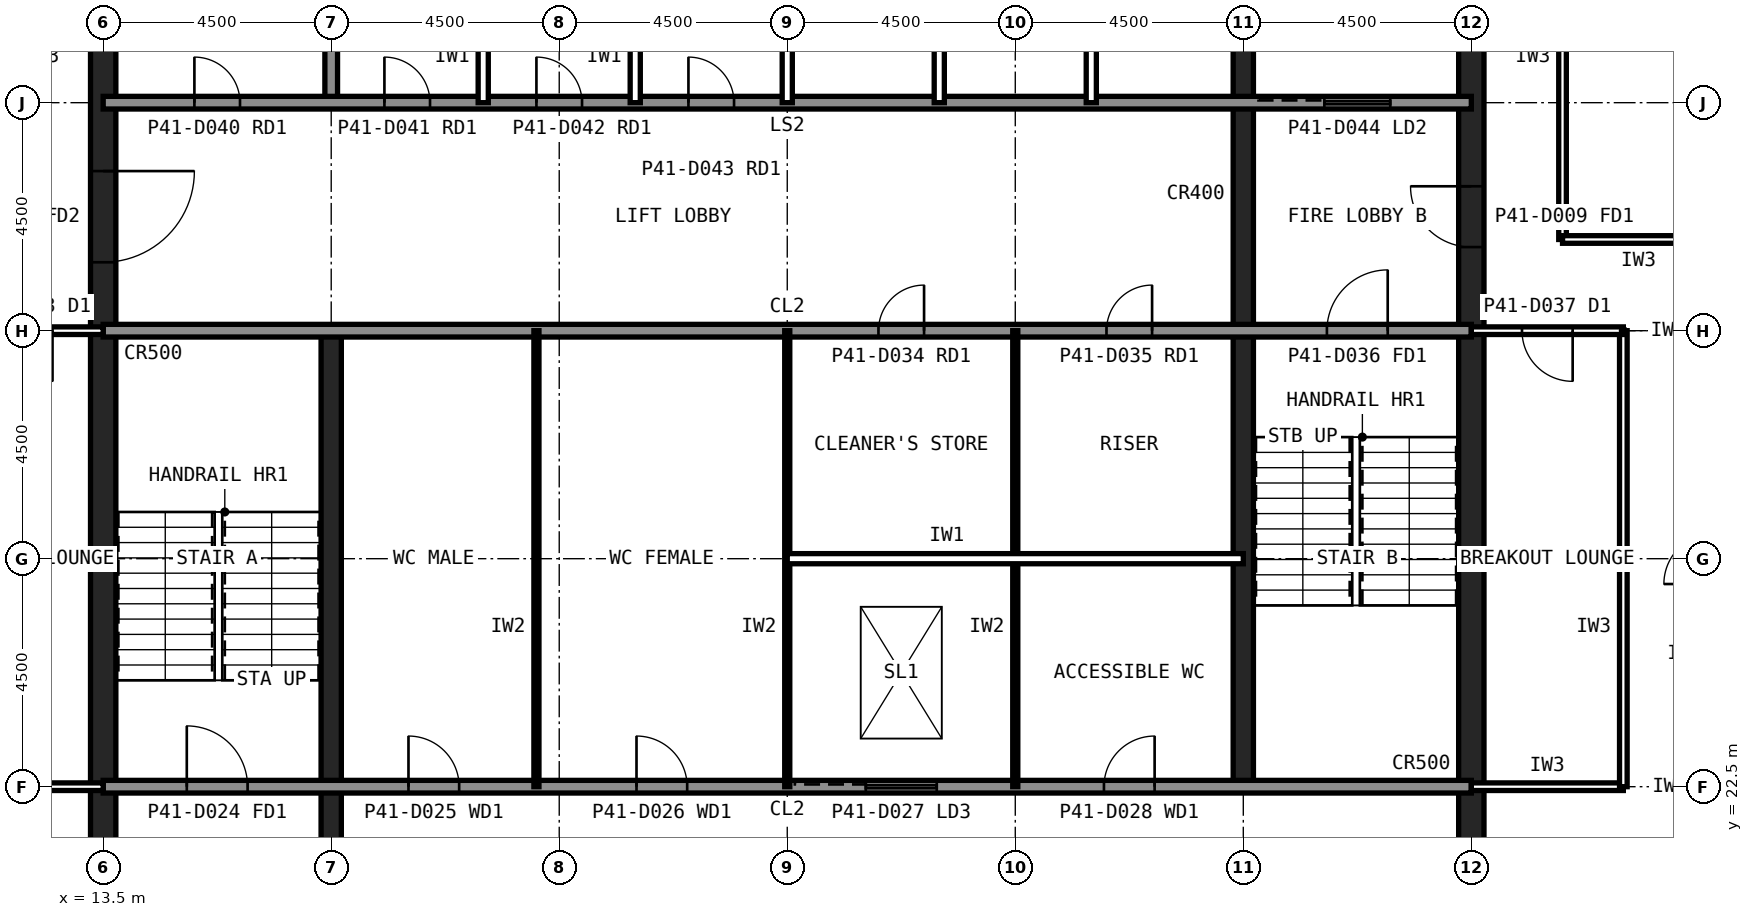
"""IFC4 building model, lengths in metres.
Left out: names, types, materials, properties, quantities, classifications, styles, units other than length and angle.
Written with IfcOpenShell. Run it as: python <this file> out.ifc"""

import sys

from ifc_helpers import new_model, si_unit, direction, frame, frame_2d, origin, place, context, subcontext, project, spatial, rectangle, extrude, element, fill, save


model = new_model("IFC4")
c1 = context("Model", 3, precision=1e-05, world=origin(), true_north=direction((0.0, 1.0)))
c2 = subcontext(c1, "Body", "Model", "MODEL_VIEW")
j1 = project(units=[si_unit("LENGTHUNIT", "METRE"), si_unit("PLANEANGLEUNIT", "RADIAN")], contexts=[c1])
p1 = place(None, origin())
s1 = spatial("IfcSite", under=j1, at=p1, CompositionType="ELEMENT")
p2 = place(p1, origin())
s2 = spatial("IfcBuilding", under=s1, at=p2, CompositionType="ELEMENT")
p3 = place(p2, frame((0.0, 0.0, 175.6)))
s3 = spatial("IfcBuildingStorey", under=s2, at=p3, CompositionType="ELEMENT", Elevation=175.6)
p4 = place(p3, frame((40.5, 13.5, 0.0), z_axis=(0.0, 0.0, 1.0), x_axis=(0.0, 1.0, 0.0)))
e1 = element("IfcWall", 1, at=p4, inside=s3, PredefinedType="SHEAR", context=c2, shape_type="SweptSolid", body=[
    extrude(rectangle(XDim=27.0, YDim=0.5, at=frame_2d((13.5, 0.0))), origin(), (0.0, 0.0, 1.0), 4.0),
])
p5 = place(p4, frame((5.85, 0.0, 0.0)))
e2 = element("IfcOpeningElement", 2, at=p5, cuts=e1, PredefinedType="OPENING", context=c2, shape_type="SweptSolid", body=[
    extrude(rectangle(XDim=1.8, YDim=2.1, at=frame_2d((0.9, 1.05))), frame((0.0, 0.26, 0.0), z_axis=(0.0, -1.0, 0.0), x_axis=(1.0, 0.0, 0.0)), (0.0, 0.0, 1.0), 0.52),
])
p6 = place(p4, frame((19.65, 0.0, 0.0)))
e3 = element("IfcOpeningElement", 3, at=p6, cuts=e1, PredefinedType="OPENING", context=c2, shape_type="SweptSolid", body=[
    extrude(rectangle(XDim=1.2, YDim=2.1, at=frame_2d((0.6, 1.05))), frame((0.0, 0.26, 0.0), z_axis=(0.0, -1.0, 0.0), x_axis=(1.0, 0.0, 0.0)), (0.0, 0.0, 1.0), 0.52),
])
p7 = place(p3, frame((13.5, 40.5, 0.0), z_axis=(0.0, 0.0, 1.0), x_axis=(0.0, -1.0, 0.0)))
e4 = element("IfcWall", 4, at=p7, inside=s3, PredefinedType="SHEAR", context=c2, shape_type="SweptSolid", body=[
    extrude(rectangle(XDim=27.0, YDim=0.5, at=frame_2d((13.5, 0.0))), origin(), (0.0, 0.0, 1.0), 4.0),
])
p8 = place(p7, frame((19.65, 0.0, 0.0)))
e5 = element("IfcOpeningElement", 5, at=p8, cuts=e4, PredefinedType="OPENING", context=c2, shape_type="SweptSolid", body=[
    extrude(rectangle(XDim=1.2, YDim=2.1, at=frame_2d((0.6, 1.05))), frame((0.0, 0.26, 0.0), z_axis=(0.0, -1.0, 0.0), x_axis=(1.0, 0.0, 0.0)), (0.0, 0.0, 1.0), 0.52),
])
p9 = place(p7, frame((5.85, 0.0, 0.0)))
e6 = element("IfcOpeningElement", 6, at=p9, cuts=e4, PredefinedType="OPENING", context=c2, shape_type="SweptSolid", body=[
    extrude(rectangle(XDim=1.8, YDim=2.1, at=frame_2d((0.9, 1.05))), frame((0.0, 0.26, 0.0), z_axis=(0.0, -1.0, 0.0), x_axis=(1.0, 0.0, 0.0)), (0.0, 0.0, 1.0), 0.52),
])
p10 = place(p3, frame((18.0, 13.5, 0.0), z_axis=(0.0, 0.0, 1.0), x_axis=(0.0, 1.0, 0.0)))
e7 = element("IfcWall", 7, at=p10, inside=s3, PredefinedType="SHEAR", context=c2, shape_type="SweptSolid", body=[
    extrude(rectangle(XDim=18.0, YDim=0.4, at=frame_2d((9.0, 0.0))), origin(), (0.0, 0.0, 1.0), 4.0),
])
p11 = place(p3, frame((18.0, 36.0, 0.0), z_axis=(0.0, 0.0, 1.0), x_axis=(0.0, 1.0, 0.0)))
e8 = element("IfcWall", 8, at=p11, inside=s3, PredefinedType="SOLIDWALL", context=c2, shape_type="SweptSolid", body=[
    extrude(rectangle(XDim=4.5, YDim=0.25, at=frame_2d((2.25, 0.0))), origin(), (0.0, 0.0, 1.0), 3.84),
])
p12 = place(p3, frame((36.0, 22.5, 0.0), z_axis=(0.0, 0.0, 1.0), x_axis=(0.0, 1.0, 0.0)))
e9 = element("IfcWall", 9, at=p12, inside=s3, PredefinedType="SHEAR", context=c2, shape_type="SweptSolid", body=[
    extrude(rectangle(XDim=18.0, YDim=0.4, at=frame_2d((9.0, 0.0))), origin(), (0.0, 0.0, 1.0), 4.0),
])
p13 = place(p3, frame((13.5, 36.0, 0.0), z_axis=(0.0, 0.0, 1.0), x_axis=(1.0, 0.0, 0.0)))
e10 = element("IfcWall", 10, at=p13, inside=s3, PredefinedType="SOLIDWALL", context=c2, shape_type="SweptSolid", body=[
    extrude(rectangle(XDim=27.0, YDim=0.25, at=frame_2d((13.5, 0.0))), origin(), (0.0, 0.0, 1.0), 3.84),
])
p14 = place(p13, frame((1.8, 0.0, 0.0)))
e11 = element("IfcOpeningElement", 11, at=p14, cuts=e10, PredefinedType="OPENING", context=c2, shape_type="SweptSolid", body=[
    extrude(rectangle(XDim=0.9, YDim=2.1, at=frame_2d((0.45, 1.05))), frame((0.0, 0.135, 0.0), z_axis=(0.0, -1.0, 0.0), x_axis=(1.0, 0.0, 0.0)), (0.0, 0.0, 1.0), 0.27),
])
p15 = place(p13, frame((5.55, 0.0, 0.0)))
e12 = element("IfcOpeningElement", 12, at=p15, cuts=e10, PredefinedType="OPENING", context=c2, shape_type="SweptSolid", body=[
    extrude(rectangle(XDim=0.9, YDim=2.1, at=frame_2d((0.45, 1.05))), frame((0.0, 0.135, 0.0), z_axis=(0.0, -1.0, 0.0), x_axis=(1.0, 0.0, 0.0)), (0.0, 0.0, 1.0), 0.27),
])
p16 = place(p13, frame((8.55, 0.0, 0.0)))
e13 = element("IfcOpeningElement", 13, at=p16, cuts=e10, PredefinedType="OPENING", context=c2, shape_type="SweptSolid", body=[
    extrude(rectangle(XDim=0.9, YDim=2.1, at=frame_2d((0.45, 1.05))), frame((0.0, 0.135, 0.0), z_axis=(0.0, -1.0, 0.0), x_axis=(1.0, 0.0, 0.0)), (0.0, 0.0, 1.0), 0.27),
])
p17 = place(p13, frame((11.55, 0.0, 0.0)))
e14 = element("IfcOpeningElement", 14, at=p17, cuts=e10, PredefinedType="OPENING", context=c2, shape_type="SweptSolid", body=[
    extrude(rectangle(XDim=0.9, YDim=2.1, at=frame_2d((0.45, 1.05))), frame((0.0, 0.135, 0.0), z_axis=(0.0, -1.0, 0.0), x_axis=(1.0, 0.0, 0.0)), (0.0, 0.0, 1.0), 0.27),
])
p18 = place(p13, frame((24.1, 0.0, 0.0)))
e15 = element("IfcOpeningElement", 15, at=p18, cuts=e10, PredefinedType="OPENING", context=c2, shape_type="SweptSolid", body=[
    extrude(rectangle(XDim=1.3, YDim=2.2, at=frame_2d((0.65, 1.1))), frame((0.0, 0.135, 0.0), z_axis=(0.0, -1.0, 0.0), x_axis=(1.0, 0.0, 0.0)), (0.0, 0.0, 1.0), 0.27),
])
p19 = place(p3, frame((13.5, 22.5, 0.0), z_axis=(0.0, 0.0, 1.0), x_axis=(1.0, 0.0, 0.0)))
e16 = element("IfcWall", 16, at=p19, inside=s3, PredefinedType="SOLIDWALL", context=c2, shape_type="SweptSolid", body=[
    extrude(rectangle(XDim=27.0, YDim=0.25, at=frame_2d((13.5, 0.0))), origin(), (0.0, 0.0, 1.0), 3.84),
])
p20 = place(p19, frame((1.65, 0.0, 0.0)))
e17 = element("IfcOpeningElement", 17, at=p20, cuts=e16, PredefinedType="OPENING", context=c2, shape_type="SweptSolid", body=[
    extrude(rectangle(XDim=1.2, YDim=2.1, at=frame_2d((0.6, 1.05))), frame((0.0, 0.135, 0.0), z_axis=(0.0, -1.0, 0.0), x_axis=(1.0, 0.0, 0.0)), (0.0, 0.0, 1.0), 0.27),
])
p21 = place(p19, frame((6.025, 0.0, 0.0)))
e18 = element("IfcOpeningElement", 18, at=p21, cuts=e16, PredefinedType="OPENING", context=c2, shape_type="SweptSolid", body=[
    extrude(rectangle(XDim=1.0, YDim=2.1, at=frame_2d((0.5, 1.05))), frame((0.0, 0.135, 0.0), z_axis=(0.0, -1.0, 0.0), x_axis=(1.0, 0.0, 0.0)), (0.0, 0.0, 1.0), 0.27),
])
p22 = place(p19, frame((10.525, 0.0, 0.0)))
e19 = element("IfcOpeningElement", 19, at=p22, cuts=e16, PredefinedType="OPENING", context=c2, shape_type="SweptSolid", body=[
    extrude(rectangle(XDim=1.0, YDim=2.1, at=frame_2d((0.5, 1.05))), frame((0.0, 0.135, 0.0), z_axis=(0.0, -1.0, 0.0), x_axis=(1.0, 0.0, 0.0)), (0.0, 0.0, 1.0), 0.27),
])
p23 = place(p19, frame((19.75, 0.0, 0.0)))
e20 = element("IfcOpeningElement", 20, at=p23, cuts=e16, PredefinedType="OPENING", context=c2, shape_type="SweptSolid", body=[
    extrude(rectangle(XDim=1.0, YDim=2.1, at=frame_2d((0.5, 1.05))), frame((0.0, 0.135, 0.0), z_axis=(0.0, -1.0, 0.0), x_axis=(1.0, 0.0, 0.0)), (0.0, 0.0, 1.0), 0.27),
])
p24 = place(p19, frame((15.05, 0.0, 0.0)))
e21 = element("IfcOpeningElement", 21, at=p24, cuts=e16, PredefinedType="OPENING", context=c2, shape_type="SweptSolid", body=[
    extrude(rectangle(XDim=1.4, YDim=2.4, at=frame_2d((0.7, 1.2))), frame((0.0, 0.135, 0.0), z_axis=(0.0, -1.0, 0.0), x_axis=(1.0, 0.0, 0.0)), (0.0, 0.0, 1.0), 0.27),
])
p25 = place(p3, frame((13.5, 31.5, 0.0), z_axis=(0.0, 0.0, 1.0), x_axis=(1.0, 0.0, 0.0)))
e22 = element("IfcWall", 22, at=p25, inside=s3, PredefinedType="SOLIDWALL", context=c2, shape_type="SweptSolid", body=[
    extrude(rectangle(XDim=27.0, YDim=0.25, at=frame_2d((13.5, 0.0))), origin(), (0.0, 0.0, 1.0), 3.84),
])
p26 = place(p25, frame((24.15, 0.0, 0.0)))
e23 = element("IfcOpeningElement", 23, at=p26, cuts=e22, PredefinedType="OPENING", context=c2, shape_type="SweptSolid", body=[
    extrude(rectangle(XDim=1.2, YDim=2.1, at=frame_2d((0.6, 1.05))), frame((0.0, 0.135, 0.0), z_axis=(0.0, -1.0, 0.0), x_axis=(1.0, 0.0, 0.0)), (0.0, 0.0, 1.0), 0.27),
])
p27 = place(p25, frame((15.3, 0.0, 0.0)))
e24 = element("IfcOpeningElement", 24, at=p27, cuts=e22, PredefinedType="OPENING", context=c2, shape_type="SweptSolid", body=[
    extrude(rectangle(XDim=0.9, YDim=2.1, at=frame_2d((0.45, 1.05))), frame((0.0, 0.135, 0.0), z_axis=(0.0, -1.0, 0.0), x_axis=(1.0, 0.0, 0.0)), (0.0, 0.0, 1.0), 0.27),
])
p28 = place(p25, frame((19.8, 0.0, 0.0)))
e25 = element("IfcOpeningElement", 25, at=p28, cuts=e22, PredefinedType="OPENING", context=c2, shape_type="SweptSolid", body=[
    extrude(rectangle(XDim=0.9, YDim=2.1, at=frame_2d((0.45, 1.05))), frame((0.0, 0.135, 0.0), z_axis=(0.0, -1.0, 0.0), x_axis=(1.0, 0.0, 0.0)), (0.0, 0.0, 1.0), 0.27),
])
for number, where, z_axis, x_axis in (
    (26, (21.0, 36.0, 0.0), (0.0, 0.0, 1.0), (0.0, 1.0, 0.0)),
    (27, (24.0, 36.0, 0.0), (0.0, 0.0, 1.0), (0.0, 1.0, 0.0)),
    (28, (27.0, 36.0, 0.0), (0.0, 0.0, 1.0), (0.0, 1.0, 0.0)),
    (29, (30.0, 36.0, 0.0), (0.0, 0.0, 1.0), (0.0, 1.0, 0.0)),
    (30, (33.0, 36.0, 0.0), (0.0, 0.0, 1.0), (0.0, 1.0, 0.0)),
):
    element("IfcWall", number, at=place(p3, frame(where, z_axis=z_axis, x_axis=x_axis)), inside=s3, PredefinedType="PARTITIONING", context=c2, shape_type="SweptSolid", body=[
        extrude(rectangle(XDim=4.5, YDim=0.2, at=frame_2d((2.25, 0.0))), origin(), (0.0, 0.0, 1.0), 3.84),
    ])
for number, where, z_axis, x_axis in (
    (31, (22.05, 22.5, 0.0), (0.0, 0.0, 1.0), (0.0, 1.0, 0.0)),
    (32, (27.0, 22.5, 0.0), (0.0, 0.0, 1.0), (0.0, 1.0, 0.0)),
    (33, (31.5, 22.5, 0.0), (0.0, 0.0, 1.0), (0.0, 1.0, 0.0)),
):
    element("IfcWall", number, at=place(p3, frame(where, z_axis=z_axis, x_axis=x_axis)), inside=s3, PredefinedType="PLUMBINGWALL", context=c2, shape_type="SweptSolid", body=[
        extrude(rectangle(XDim=9.0, YDim=0.1, at=frame_2d((4.5, 0.0))), origin(), (0.0, 0.0, 1.0), 3.84),
    ])
p29 = place(p3, frame((27.0, 27.0, 0.0), z_axis=(0.0, 0.0, 1.0), x_axis=(1.0, 0.0, 0.0)))
e34 = element("IfcWall", 34, at=p29, inside=s3, PredefinedType="PARTITIONING", context=c2, shape_type="SweptSolid", body=[
    extrude(rectangle(XDim=9.0, YDim=0.2, at=frame_2d((4.5, 0.0))), origin(), (0.0, 0.0, 1.0), 3.84),
])
p30 = place(p3, frame((42.3, 33.3, 0.0), z_axis=(0.0, 0.0, 1.0), x_axis=(0.0, 1.0, 0.0)))
e35 = element("IfcWall", 35, at=p30, inside=s3, PredefinedType="PARTITIONING", context=c2, shape_type="SweptSolid", body=[
    extrude(rectangle(XDim=7.2, YDim=0.15, at=frame_2d((3.6, 0.0))), origin(), (0.0, 0.0, 1.0), 3.84),
])
p31 = place(p3, frame((45.3, 33.3, 0.0), z_axis=(0.0, 0.0, 1.0), x_axis=(-1.0, 0.0, 0.0)))
e36 = element("IfcWall", 36, at=p31, inside=s3, PredefinedType="PARTITIONING", context=c2, shape_type="SweptSolid", body=[
    extrude(rectangle(XDim=3.0, YDim=0.15, at=frame_2d((1.5, 0.0))), origin(), (0.0, 0.0, 1.0), 3.84),
])
p32 = place(p3, frame((40.5, 22.5, 0.0), z_axis=(0.0, 0.0, 1.0), x_axis=(1.0, 0.0, 0.0)))
e37 = element("IfcWall", 37, at=p32, inside=s3, PredefinedType="PARTITIONING", context=c2, shape_type="SweptSolid", body=[
    extrude(rectangle(XDim=3.0, YDim=0.15, at=frame_2d((1.5, 0.0))), origin(), (0.0, 0.0, 1.0), 2.989),
])
p33 = place(p3, frame((43.5, 22.5, 0.0), z_axis=(0.0, 0.0, 1.0), x_axis=(0.0, 1.0, 0.0)))
e38 = element("IfcWall", 38, at=p33, inside=s3, PredefinedType="PARTITIONING", context=c2, shape_type="SweptSolid", body=[
    extrude(rectangle(XDim=9.0, YDim=0.15, at=frame_2d((4.5, 0.0))), origin(), (0.0, 0.0, 1.0), 3.84),
])
p34 = place(p3, frame((43.5, 31.5, 0.0), z_axis=(0.0, 0.0, 1.0), x_axis=(-1.0, 0.0, 0.0)))
e39 = element("IfcWall", 39, at=p34, inside=s3, PredefinedType="PARTITIONING", context=c2, shape_type="SweptSolid", body=[
    extrude(rectangle(XDim=3.0, YDim=0.15, at=frame_2d((1.5, 0.0))), origin(), (0.0, 0.0, 1.0), 2.989),
])
p35 = place(p34, frame((1.0, 0.0, 0.0)))
e40 = element("IfcOpeningElement", 40, at=p35, cuts=e39, PredefinedType="OPENING", context=c2, shape_type="SweptSolid", body=[
    extrude(rectangle(XDim=1.0, YDim=2.1, at=frame_2d((0.5, 1.05))), frame((0.0, 0.085, 0.0), z_axis=(0.0, -1.0, 0.0), x_axis=(1.0, 0.0, 0.0)), (0.0, 0.0, 1.0), 0.17),
])
p36 = place(p3, frame((10.5, 22.5, 0.0), z_axis=(0.0, 0.0, 1.0), x_axis=(1.0, 0.0, 0.0)))
e41 = element("IfcWall", 41, at=p36, inside=s3, PredefinedType="PARTITIONING", context=c2, shape_type="SweptSolid", body=[
    extrude(rectangle(XDim=3.0, YDim=0.15, at=frame_2d((1.5, 0.0))), origin(), (0.0, 0.0, 1.0), 2.989),
])
p37 = place(p3, frame((13.5, 31.5, 0.0), z_axis=(0.0, 0.0, 1.0), x_axis=(-1.0, 0.0, 0.0)))
e42 = element("IfcWall", 42, at=p37, inside=s3, PredefinedType="PARTITIONING", context=c2, shape_type="SweptSolid", body=[
    extrude(rectangle(XDim=3.0, YDim=0.15, at=frame_2d((1.5, 0.0))), origin(), (0.0, 0.0, 1.0), 2.989),
])
p38 = place(p37, frame((1.0, 0.0, 0.0)))
e43 = element("IfcOpeningElement", 43, at=p38, cuts=e42, PredefinedType="OPENING", context=c2, shape_type="SweptSolid", body=[
    extrude(rectangle(XDim=1.0, YDim=2.1, at=frame_2d((0.5, 1.05))), frame((0.0, 0.085, 0.0), z_axis=(0.0, -1.0, 0.0), x_axis=(1.0, 0.0, 0.0)), (0.0, 0.0, 1.0), 0.17),
])
p39 = place(p9, origin())
e44 = element("IfcDoor", 44, at=p39, inside=s3, OperationType="SINGLE_SWING_LEFT", PredefinedType="DOOR", context=c2, shape_type="SweptSolid", body=[
    extrude(rectangle(XDim=1.8, YDim=2.1, at=frame_2d((0.9, 1.05))), frame((0.0, 0.025, 0.0), z_axis=(0.0, -1.0, 0.0), x_axis=(1.0, 0.0, 0.0)), (0.0, 0.0, 1.0), 0.05),
])
fill(e6, e44)
p40 = place(p6, origin())
e45 = element("IfcDoor", 45, at=p40, inside=s3, OperationType="SINGLE_SWING_RIGHT", PredefinedType="DOOR", context=c2, shape_type="SweptSolid", body=[
    extrude(rectangle(XDim=1.2, YDim=2.1, at=frame_2d((0.6, 1.05))), frame((0.0, 0.025, 0.0), z_axis=(0.0, -1.0, 0.0), x_axis=(1.0, 0.0, 0.0)), (0.0, 0.0, 1.0), 0.05),
])
fill(e3, e45)
p41 = place(p20, origin())
e46 = element("IfcDoor", 46, at=p41, inside=s3, OperationType="SINGLE_SWING_LEFT", PredefinedType="DOOR", context=c2, shape_type="SweptSolid", body=[
    extrude(rectangle(XDim=1.2, YDim=2.1, at=frame_2d((0.6, 1.05))), frame((0.0, 0.025, 0.0), z_axis=(0.0, -1.0, 0.0), x_axis=(1.0, 0.0, 0.0)), (0.0, 0.0, 1.0), 0.05),
])
fill(e17, e46)
p42 = place(p26, origin())
e47 = element("IfcDoor", 47, at=p42, inside=s3, OperationType="SINGLE_SWING_RIGHT", PredefinedType="DOOR", context=c2, shape_type="SweptSolid", body=[
    extrude(rectangle(XDim=1.2, YDim=2.1, at=frame_2d((0.6, 1.05))), frame((0.0, 0.025, 0.0), z_axis=(0.0, -1.0, 0.0), x_axis=(1.0, 0.0, 0.0)), (0.0, 0.0, 1.0), 0.05),
])
fill(e23, e47)
p43 = place(p21, origin())
e48 = element("IfcDoor", 48, at=p43, inside=s3, OperationType="SINGLE_SWING_LEFT", PredefinedType="DOOR", context=c2, shape_type="SweptSolid", body=[
    extrude(rectangle(XDim=1.0, YDim=2.1, at=frame_2d((0.5, 1.05))), frame((0.0, 0.025, 0.0), z_axis=(0.0, -1.0, 0.0), x_axis=(1.0, 0.0, 0.0)), (0.0, 0.0, 1.0), 0.05),
])
fill(e18, e48)
p44 = place(p22, origin())
e49 = element("IfcDoor", 49, at=p44, inside=s3, OperationType="SINGLE_SWING_LEFT", PredefinedType="DOOR", context=c2, shape_type="SweptSolid", body=[
    extrude(rectangle(XDim=1.0, YDim=2.1, at=frame_2d((0.5, 1.05))), frame((0.0, 0.025, 0.0), z_axis=(0.0, -1.0, 0.0), x_axis=(1.0, 0.0, 0.0)), (0.0, 0.0, 1.0), 0.05),
])
fill(e19, e49)
p45 = place(p23, origin())
e50 = element("IfcDoor", 50, at=p45, inside=s3, OperationType="SINGLE_SWING_RIGHT", PredefinedType="DOOR", context=c2, shape_type="SweptSolid", body=[
    extrude(rectangle(XDim=1.0, YDim=2.1, at=frame_2d((0.5, 1.05))), frame((0.0, 0.025, 0.0), z_axis=(0.0, -1.0, 0.0), x_axis=(1.0, 0.0, 0.0)), (0.0, 0.0, 1.0), 0.05),
])
fill(e20, e50)
p46 = place(p27, origin())
e51 = element("IfcDoor", 51, at=p46, inside=s3, OperationType="SINGLE_SWING_RIGHT", PredefinedType="DOOR", context=c2, shape_type="SweptSolid", body=[
    extrude(rectangle(XDim=0.9, YDim=2.1, at=frame_2d((0.45, 1.05))), frame((0.0, 0.025, 0.0), z_axis=(0.0, -1.0, 0.0), x_axis=(1.0, 0.0, 0.0)), (0.0, 0.0, 1.0), 0.05),
])
fill(e24, e51)
p47 = place(p28, origin())
e52 = element("IfcDoor", 52, at=p47, inside=s3, OperationType="SINGLE_SWING_RIGHT", PredefinedType="DOOR", context=c2, shape_type="SweptSolid", body=[
    extrude(rectangle(XDim=0.9, YDim=2.1, at=frame_2d((0.45, 1.05))), frame((0.0, 0.025, 0.0), z_axis=(0.0, -1.0, 0.0), x_axis=(1.0, 0.0, 0.0)), (0.0, 0.0, 1.0), 0.05),
])
fill(e25, e52)
p48 = place(p14, origin())
e53 = element("IfcDoor", 53, at=p48, inside=s3, OperationType="SINGLE_SWING_LEFT", PredefinedType="DOOR", context=c2, shape_type="SweptSolid", body=[
    extrude(rectangle(XDim=0.9, YDim=2.1, at=frame_2d((0.45, 1.05))), frame((0.0, 0.025, 0.0), z_axis=(0.0, -1.0, 0.0), x_axis=(1.0, 0.0, 0.0)), (0.0, 0.0, 1.0), 0.05),
])
fill(e11, e53)
p49 = place(p15, origin())
e54 = element("IfcDoor", 54, at=p49, inside=s3, OperationType="SINGLE_SWING_LEFT", PredefinedType="DOOR", context=c2, shape_type="SweptSolid", body=[
    extrude(rectangle(XDim=0.9, YDim=2.1, at=frame_2d((0.45, 1.05))), frame((0.0, 0.025, 0.0), z_axis=(0.0, -1.0, 0.0), x_axis=(1.0, 0.0, 0.0)), (0.0, 0.0, 1.0), 0.05),
])
fill(e12, e54)
p50 = place(p16, origin())
e55 = element("IfcDoor", 55, at=p50, inside=s3, OperationType="SINGLE_SWING_LEFT", PredefinedType="DOOR", context=c2, shape_type="SweptSolid", body=[
    extrude(rectangle(XDim=0.9, YDim=2.1, at=frame_2d((0.45, 1.05))), frame((0.0, 0.025, 0.0), z_axis=(0.0, -1.0, 0.0), x_axis=(1.0, 0.0, 0.0)), (0.0, 0.0, 1.0), 0.05),
])
fill(e13, e55)
p51 = place(p17, origin())
e56 = element("IfcDoor", 56, at=p51, inside=s3, OperationType="SINGLE_SWING_LEFT", PredefinedType="DOOR", context=c2, shape_type="SweptSolid", body=[
    extrude(rectangle(XDim=0.9, YDim=2.1, at=frame_2d((0.45, 1.05))), frame((0.0, 0.025, 0.0), z_axis=(0.0, -1.0, 0.0), x_axis=(1.0, 0.0, 0.0)), (0.0, 0.0, 1.0), 0.05),
])
fill(e14, e56)
p52 = place(p18, origin())
e57 = element("IfcDoor", 57, at=p52, inside=s3, OperationType="SLIDING_TO_LEFT", PredefinedType="DOOR", context=c2, shape_type="SweptSolid", body=[
    extrude(rectangle(XDim=1.3, YDim=2.2, at=frame_2d((0.65, 1.1))), frame((0.0, 0.025, 0.0), z_axis=(0.0, -1.0, 0.0), x_axis=(1.0, 0.0, 0.0)), (0.0, 0.0, 1.0), 0.05),
])
fill(e15, e57)
p53 = place(p24, origin())
e58 = element("IfcDoor", 58, at=p53, inside=s3, OperationType="SLIDING_TO_LEFT", PredefinedType="DOOR", context=c2, shape_type="SweptSolid", body=[
    extrude(rectangle(XDim=1.4, YDim=2.4, at=frame_2d((0.7, 1.2))), frame((0.0, 0.025, 0.0), z_axis=(0.0, -1.0, 0.0), x_axis=(1.0, 0.0, 0.0)), (0.0, 0.0, 1.0), 0.05),
])
fill(e21, e58)
p54 = place(p35, origin())
e59 = element("IfcDoor", 59, at=p54, inside=s3, OperationType="SINGLE_SWING_LEFT", PredefinedType="DOOR", context=c2, shape_type="SweptSolid", body=[
    extrude(rectangle(XDim=1.0, YDim=2.1, at=frame_2d((0.5, 1.05))), frame((0.0, 0.025, 0.0), z_axis=(0.0, -1.0, 0.0), x_axis=(1.0, 0.0, 0.0)), (0.0, 0.0, 1.0), 0.05),
])
fill(e40, e59)
save(model, sys.argv[1])
